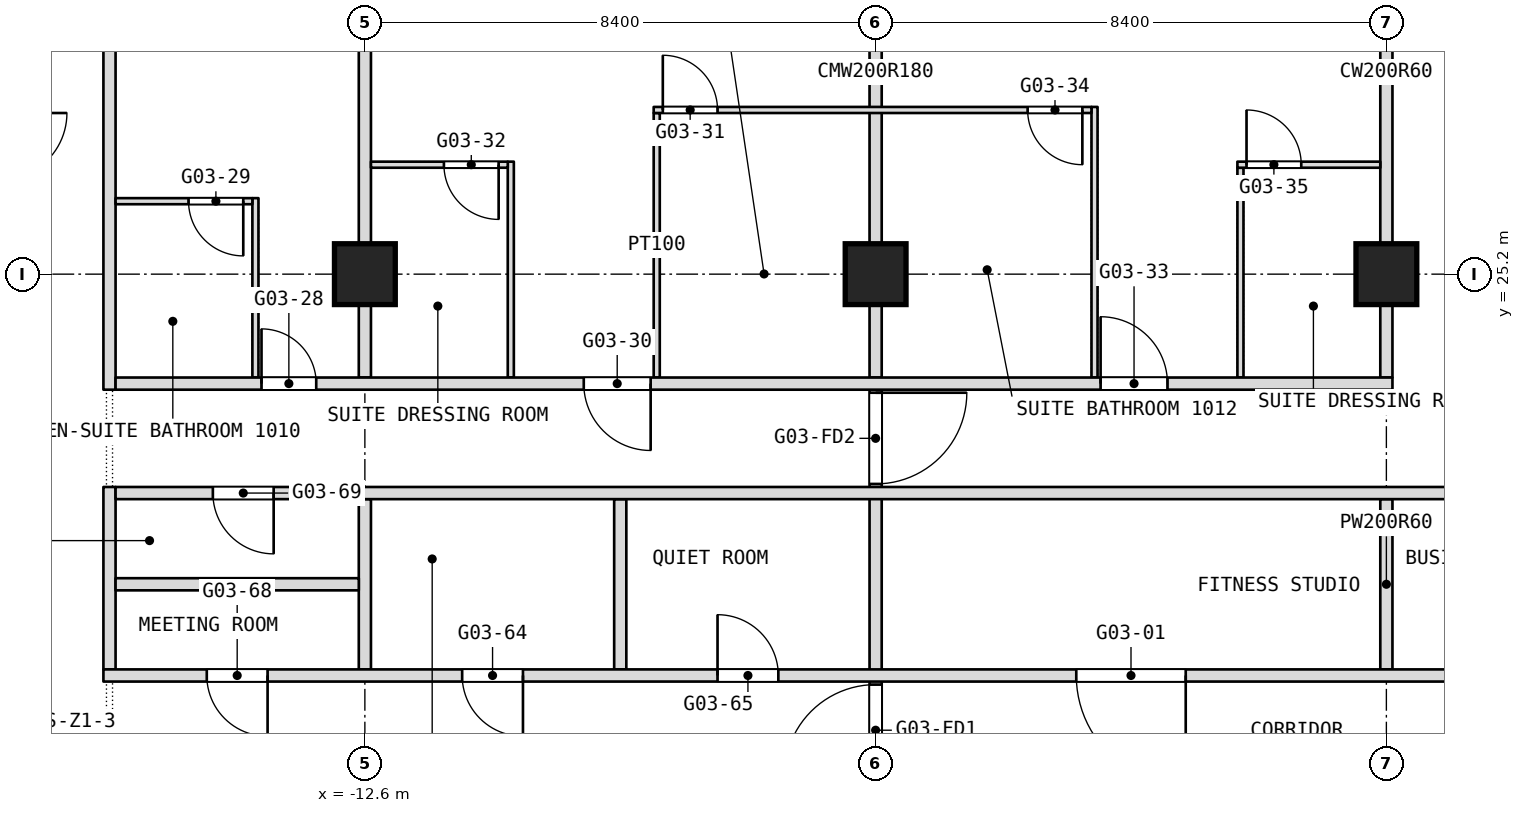
"""IFC4 building model, lengths in metres.
Left out: names, types, materials, properties, quantities, classifications, styles, units other than length and angle.
Written with IfcOpenShell. Run it as: python <this file> out.ifc"""

import sys

from ifc_helpers import new_model, si_unit, direction, frame, frame_2d, origin, origin_2d, place, context, subcontext, project, spatial, rectangle, extrude, element, fill, save


model = new_model("IFC4")
c1 = context("Model", 3, precision=1e-05, world=origin(), true_north=direction((0.0, 1.0)))
c2 = subcontext(c1, "Body", "Model", "MODEL_VIEW")
j1 = project(units=[si_unit("LENGTHUNIT", "METRE"), si_unit("PLANEANGLEUNIT", "RADIAN")], contexts=[c1])
p1 = place(None, origin())
s1 = spatial("IfcSite", under=j1, at=p1, CompositionType="ELEMENT")
p2 = place(p1, origin())
s2 = spatial("IfcBuilding", under=s1, at=p2, CompositionType="ELEMENT")
p3 = place(p2, frame((0.0, 0.0, 50.9)))
s3 = spatial("IfcBuildingStorey", under=s2, at=p3, CompositionType="ELEMENT", Elevation=50.9)
for number, where, z_axis, x_axis in (
    (1, (-12.6, 25.2, 0.0), (0.0, 0.0, 1.0), (1.0, 0.0, 0.0)),
    (2, (-4.2, 25.2, 0.0), (0.0, 0.0, 1.0), (1.0, 0.0, 0.0)),
    (3, (4.2, 25.2, 0.0), (0.0, 0.0, 1.0), (1.0, 0.0, 0.0)),
):
    element("IfcColumn", number, at=place(p3, frame(where, z_axis=z_axis, x_axis=x_axis)), inside=s3, PredefinedType="COLUMN", context=c2, shape_type="SweptSolid", body=[
        extrude(rectangle(XDim=1.0, YDim=1.0, at=origin_2d()), origin(), (0.0, 0.0, 1.0), 3.6),
    ])
p4 = place(p3, frame((4.2, 18.7, 0.0), z_axis=(0.0, 0.0, 1.0), x_axis=(0.0, 1.0, 0.0)))
e4 = element("IfcWall", 4, at=p4, inside=s3, PredefinedType="PARTITIONING", context=c2, shape_type="SweptSolid", body=[
    extrude(rectangle(XDim=2.8, YDim=0.2, at=frame_2d((1.4, 0.0))), origin(), (0.0, 0.0, 1.0), 3.34),
])
p5 = place(p3, frame((4.2, 23.5, 0.0), z_axis=(0.0, 0.0, 1.0), x_axis=(0.0, 1.0, 0.0)))
e5 = element("IfcWall", 5, at=p5, inside=s3, PredefinedType="PARTITIONING", context=c2, shape_type="SweptSolid", body=[
    extrude(rectangle(XDim=10.04, YDim=0.2, at=frame_2d((5.02, 0.0))), origin(), (0.0, 0.0, 1.0), 3.34),
])
p6 = place(p3, frame((1.8, 23.5, 0.0), z_axis=(0.0, 0.0, 1.0), x_axis=(0.0, 1.0, 0.0)))
e6 = element("IfcWall", 6, at=p6, inside=s3, PredefinedType="PARTITIONING", context=c2, shape_type="SweptSolid", body=[
    extrude(rectangle(XDim=3.45, YDim=0.1, at=frame_2d((1.725, 0.0))), origin(), (0.0, 0.0, 1.0), 3.34),
])
p7 = place(p3, frame((-0.6, 23.5, 0.0), z_axis=(0.0, 0.0, 1.0), x_axis=(0.0, 1.0, 0.0)))
e7 = element("IfcWall", 7, at=p7, inside=s3, PredefinedType="PARTITIONING", context=c2, shape_type="SweptSolid", body=[
    extrude(rectangle(XDim=4.45, YDim=0.1, at=frame_2d((2.225, 0.0))), origin(), (0.0, 0.0, 1.0), 3.34),
])
p8 = place(p3, frame((-4.2, 16.8, 0.0), z_axis=(0.0, 0.0, 1.0), x_axis=(0.0, 1.0, 0.0)))
e8 = element("IfcWall", 8, at=p8, inside=s3, PredefinedType="PARTITIONING", context=c2, shape_type="SweptSolid", body=[
    extrude(rectangle(XDim=6.7, YDim=0.2, at=frame_2d((3.35, 0.0))), origin(), (0.0, 0.0, 1.0), 3.34),
])
p9 = place(p8, frame((0.15, 0.0, 0.0)))
e9 = element("IfcOpeningElement", 9, at=p9, cuts=e8, PredefinedType="OPENING", context=c2, shape_type="SweptSolid", body=[
    extrude(rectangle(XDim=1.5, YDim=2.1, at=frame_2d((0.75, 1.05))), frame((0.0, 0.1, 0.0), z_axis=(0.0, -1.0, 0.0), x_axis=(1.0, 0.0, 0.0)), (0.0, 0.0, 1.0), 0.2),
])
p10 = place(p8, frame((4.95, 0.0, 0.0)))
e10 = element("IfcOpeningElement", 10, at=p10, cuts=e8, PredefinedType="OPENING", context=c2, shape_type="SweptSolid", body=[
    extrude(rectangle(XDim=1.5, YDim=2.1, at=frame_2d((0.75, 1.05))), frame((0.0, 0.1, 0.0), z_axis=(0.0, -1.0, 0.0), x_axis=(1.0, 0.0, 0.0)), (0.0, 0.0, 1.0), 0.2),
])
p11 = place(p3, frame((-4.2, 23.5, 0.0), z_axis=(0.0, 0.0, 1.0), x_axis=(0.0, 1.0, 0.0)))
e11 = element("IfcWall", 11, at=p11, inside=s3, PredefinedType="PARTITIONING", context=c2, shape_type="SweptSolid", body=[
    extrude(rectangle(XDim=10.04, YDim=0.2, at=frame_2d((5.02, 0.0))), origin(), (0.0, 0.0, 1.0), 3.34),
])
p12 = place(p3, frame((-7.8, 23.5, 0.0), z_axis=(0.0, 0.0, 1.0), x_axis=(0.0, 1.0, 0.0)))
e12 = element("IfcWall", 12, at=p12, inside=s3, PredefinedType="PARTITIONING", context=c2, shape_type="SweptSolid", body=[
    extrude(rectangle(XDim=4.35, YDim=0.1, at=frame_2d((2.175, 0.0))), origin(), (0.0, 0.0, 1.0), 3.34),
])
p13 = place(p3, frame((-8.4, 18.7, 0.0), z_axis=(0.0, 0.0, 1.0), x_axis=(0.0, 1.0, 0.0)))
e13 = element("IfcWall", 13, at=p13, inside=s3, PredefinedType="PARTITIONING", context=c2, shape_type="SweptSolid", body=[
    extrude(rectangle(XDim=2.8, YDim=0.2, at=frame_2d((1.4, 0.0))), origin(), (0.0, 0.0, 1.0), 3.34),
])
p14 = place(p3, frame((-10.2, 23.5, 0.0), z_axis=(0.0, 0.0, 1.0), x_axis=(0.0, 1.0, 0.0)))
e14 = element("IfcWall", 14, at=p14, inside=s3, PredefinedType="PARTITIONING", context=c2, shape_type="SweptSolid", body=[
    extrude(rectangle(XDim=3.55, YDim=0.1, at=frame_2d((1.775, 0.0))), origin(), (0.0, 0.0, 1.0), 3.34),
])
p15 = place(p3, frame((-12.6, 18.7, 0.0), z_axis=(0.0, 0.0, 1.0), x_axis=(0.0, 1.0, 0.0)))
e15 = element("IfcWall", 15, at=p15, inside=s3, PredefinedType="PARTITIONING", context=c2, shape_type="SweptSolid", body=[
    extrude(rectangle(XDim=2.8, YDim=0.2, at=frame_2d((1.4, 0.0))), origin(), (0.0, 0.0, 1.0), 3.34),
])
p16 = place(p3, frame((-12.6, 23.5, 0.0), z_axis=(0.0, 0.0, 1.0), x_axis=(0.0, 1.0, 0.0)))
e16 = element("IfcWall", 16, at=p16, inside=s3, PredefinedType="PARTITIONING", context=c2, shape_type="SweptSolid", body=[
    extrude(rectangle(XDim=10.04, YDim=0.2, at=frame_2d((5.02, 0.0))), origin(), (0.0, 0.0, 1.0), 3.34),
])
p17 = place(p3, frame((-14.4, 23.5, 0.0), z_axis=(0.0, 0.0, 1.0), x_axis=(0.0, 1.0, 0.0)))
e17 = element("IfcWall", 17, at=p17, inside=s3, PredefinedType="PARTITIONING", context=c2, shape_type="SweptSolid", body=[
    extrude(rectangle(XDim=2.95, YDim=0.1, at=frame_2d((1.475, 0.0))), origin(), (0.0, 0.0, 1.0), 3.34),
])
p18 = place(p3, frame((-16.8, 18.7, 0.0), z_axis=(0.0, 0.0, 1.0), x_axis=(0.0, 1.0, 0.0)))
e18 = element("IfcWall", 18, at=p18, inside=s3, PredefinedType="PARTITIONING", context=c2, shape_type="SweptSolid", body=[
    extrude(rectangle(XDim=3.0, YDim=0.2, at=frame_2d((1.5, 0.0))), origin(), (0.0, 0.0, 1.0), 3.34),
])
p19 = place(p3, frame((-16.8, 23.3, 0.0), z_axis=(0.0, 0.0, 1.0), x_axis=(0.0, 1.0, 0.0)))
e19 = element("IfcWall", 19, at=p19, inside=s3, PredefinedType="PARTITIONING", context=c2, shape_type="SweptSolid", body=[
    extrude(rectangle(XDim=10.24, YDim=0.2, at=frame_2d((5.12, 0.0))), origin(), (0.0, 0.0, 1.0), 3.34),
])
p20 = place(p3, frame((-16.9, 18.6, 0.0), z_axis=(0.0, 0.0, 1.0), x_axis=(1.0, 0.0, 0.0)))
e20 = element("IfcWall", 20, at=p20, inside=s3, PredefinedType="PARTITIONING", context=c2, shape_type="SweptSolid", body=[
    extrude(rectangle(XDim=25.1, YDim=0.2, at=frame_2d((12.55, 0.0))), origin(), (0.0, 0.0, 1.0), 3.34),
])
p21 = place(p20, frame((16.0, 0.0, 0.0)))
e21 = element("IfcOpeningElement", 21, at=p21, cuts=e20, PredefinedType="OPENING", context=c2, shape_type="SweptSolid", body=[
    extrude(rectangle(XDim=1.8, YDim=2.1, at=frame_2d((0.9, 1.05))), frame((0.0, 0.1, 0.0), z_axis=(0.0, -1.0, 0.0), x_axis=(1.0, 0.0, 0.0)), (0.0, 0.0, 1.0), 0.2),
])
p22 = place(p20, frame((22.55, 0.0, 0.0)))
e22 = element("IfcOpeningElement", 22, at=p22, cuts=e20, PredefinedType="OPENING", context=c2, shape_type="SweptSolid", body=[
    extrude(rectangle(XDim=1.0, YDim=2.1, at=frame_2d((0.5, 1.05))), frame((0.0, 0.1, 0.0), z_axis=(0.0, -1.0, 0.0), x_axis=(1.0, 0.0, 0.0)), (0.0, 0.0, 1.0), 0.2),
])
p23 = place(p20, frame((5.9, 0.0, 0.0)))
e23 = element("IfcOpeningElement", 23, at=p23, cuts=e20, PredefinedType="OPENING", context=c2, shape_type="SweptSolid", body=[
    extrude(rectangle(XDim=1.0, YDim=2.1, at=frame_2d((0.5, 1.05))), frame((0.0, 0.1, 0.0), z_axis=(0.0, -1.0, 0.0), x_axis=(1.0, 0.0, 0.0)), (0.0, 0.0, 1.0), 0.2),
])
p24 = place(p20, frame((10.1, 0.0, 0.0)))
e24 = element("IfcOpeningElement", 24, at=p24, cuts=e20, PredefinedType="OPENING", context=c2, shape_type="SweptSolid", body=[
    extrude(rectangle(XDim=1.0, YDim=2.1, at=frame_2d((0.5, 1.05))), frame((0.0, 0.1, 0.0), z_axis=(0.0, -1.0, 0.0), x_axis=(1.0, 0.0, 0.0)), (0.0, 0.0, 1.0), 0.2),
])
p25 = place(p20, frame((1.7, 0.0, 0.0)))
e25 = element("IfcOpeningElement", 25, at=p25, cuts=e20, PredefinedType="OPENING", context=c2, shape_type="SweptSolid", body=[
    extrude(rectangle(XDim=1.0, YDim=2.1, at=frame_2d((0.5, 1.05))), frame((0.0, 0.1, 0.0), z_axis=(0.0, -1.0, 0.0), x_axis=(1.0, 0.0, 0.0)), (0.0, 0.0, 1.0), 0.2),
])
p26 = place(p3, frame((-16.7, 20.1, 0.0), z_axis=(0.0, 0.0, 1.0), x_axis=(1.0, 0.0, 0.0)))
e26 = element("IfcWall", 26, at=p26, inside=s3, PredefinedType="PARTITIONING", context=c2, shape_type="SweptSolid", body=[
    extrude(rectangle(XDim=4.0, YDim=0.2, at=frame_2d((2.0, 0.0))), origin(), (0.0, 0.0, 1.0), 3.34),
])
p27 = place(p3, frame((-16.7, 21.6, 0.0), z_axis=(0.0, 0.0, 1.0), x_axis=(1.0, 0.0, 0.0)))
e27 = element("IfcWall", 27, at=p27, inside=s3, PredefinedType="PARTITIONING", context=c2, shape_type="SweptSolid", body=[
    extrude(rectangle(XDim=24.9, YDim=0.2, at=frame_2d((12.45, 0.0))), origin(), (0.0, 0.0, 1.0), 3.34),
])
p28 = place(p27, frame((1.6, 0.0, 0.0)))
e28 = element("IfcOpeningElement", 28, at=p28, cuts=e27, PredefinedType="OPENING", context=c2, shape_type="SweptSolid", body=[
    extrude(rectangle(XDim=1.0, YDim=2.1, at=frame_2d((0.5, 1.05))), frame((0.0, 0.1, 0.0), z_axis=(0.0, -1.0, 0.0), x_axis=(1.0, 0.0, 0.0)), (0.0, 0.0, 1.0), 0.2),
])
p29 = place(p3, frame((-16.7, 23.4, 0.0), z_axis=(0.0, 0.0, 1.0), x_axis=(1.0, 0.0, 0.0)))
e29 = element("IfcWall", 29, at=p29, inside=s3, PredefinedType="PARTITIONING", context=c2, shape_type="SweptSolid", body=[
    extrude(rectangle(XDim=21.0, YDim=0.2, at=frame_2d((10.5, 0.0))), origin(), (0.0, 0.0, 1.0), 3.34),
])
p30 = place(p29, frame((2.4, 0.0, 0.0)))
e30 = element("IfcOpeningElement", 30, at=p30, cuts=e29, PredefinedType="OPENING", context=c2, shape_type="SweptSolid", body=[
    extrude(rectangle(XDim=0.9, YDim=2.1, at=frame_2d((0.45, 1.05))), frame((0.0, 0.1, 0.0), z_axis=(0.0, -1.0, 0.0), x_axis=(1.0, 0.0, 0.0)), (0.0, 0.0, 1.0), 0.2),
])
p31 = place(p29, frame((7.7, 0.0, 0.0)))
e31 = element("IfcOpeningElement", 31, at=p31, cuts=e29, PredefinedType="OPENING", context=c2, shape_type="SweptSolid", body=[
    extrude(rectangle(XDim=1.1, YDim=2.1, at=frame_2d((0.55, 1.05))), frame((0.0, 0.1, 0.0), z_axis=(0.0, -1.0, 0.0), x_axis=(1.0, 0.0, 0.0)), (0.0, 0.0, 1.0), 0.2),
])
p32 = place(p29, frame((16.2, 0.0, 0.0)))
e32 = element("IfcOpeningElement", 32, at=p32, cuts=e29, PredefinedType="OPENING", context=c2, shape_type="SweptSolid", body=[
    extrude(rectangle(XDim=1.1, YDim=2.1, at=frame_2d((0.55, 1.05))), frame((0.0, 0.1, 0.0), z_axis=(0.0, -1.0, 0.0), x_axis=(1.0, 0.0, 0.0)), (0.0, 0.0, 1.0), 0.2),
])
p33 = place(p3, frame((-16.7, 26.4, 0.0), z_axis=(0.0, 0.0, 1.0), x_axis=(1.0, 0.0, 0.0)))
e33 = element("IfcWall", 33, at=p33, inside=s3, PredefinedType="PARTITIONING", context=c2, shape_type="SweptSolid", body=[
    extrude(rectangle(XDim=2.25, YDim=0.1, at=frame_2d((1.125, 0.0))), origin(), (0.0, 0.0, 1.0), 3.34),
])
p34 = place(p33, frame((1.2, 0.0, 0.0)))
e34 = element("IfcOpeningElement", 34, at=p34, cuts=e33, PredefinedType="OPENING", context=c2, shape_type="SweptSolid", body=[
    extrude(rectangle(XDim=0.9, YDim=2.1, at=frame_2d((0.45, 1.05))), frame((0.0, 0.05, 0.0), z_axis=(0.0, -1.0, 0.0), x_axis=(1.0, 0.0, 0.0)), (0.0, 0.0, 1.0), 0.1),
])
p35 = place(p3, frame((-12.5, 27.0, 0.0), z_axis=(0.0, 0.0, 1.0), x_axis=(1.0, 0.0, 0.0)))
e35 = element("IfcWall", 35, at=p35, inside=s3, PredefinedType="PARTITIONING", context=c2, shape_type="SweptSolid", body=[
    extrude(rectangle(XDim=2.25, YDim=0.1, at=frame_2d((1.125, 0.0))), origin(), (0.0, 0.0, 1.0), 3.34),
])
p36 = place(p35, frame((1.2, 0.0, 0.0)))
e36 = element("IfcOpeningElement", 36, at=p36, cuts=e35, PredefinedType="OPENING", context=c2, shape_type="SweptSolid", body=[
    extrude(rectangle(XDim=0.9, YDim=2.1, at=frame_2d((0.45, 1.05))), frame((0.0, 0.05, 0.0), z_axis=(0.0, -1.0, 0.0), x_axis=(1.0, 0.0, 0.0)), (0.0, 0.0, 1.0), 0.1),
])
p37 = place(p3, frame((1.75, 27.0, 0.0), z_axis=(0.0, 0.0, 1.0), x_axis=(1.0, 0.0, 0.0)))
e37 = element("IfcWall", 37, at=p37, inside=s3, PredefinedType="PARTITIONING", context=c2, shape_type="SweptSolid", body=[
    extrude(rectangle(XDim=2.35, YDim=0.1, at=frame_2d((1.175, 0.0))), origin(), (0.0, 0.0, 1.0), 3.34),
])
p38 = place(p37, frame((0.15, 0.0, 0.0)))
e38 = element("IfcOpeningElement", 38, at=p38, cuts=e37, PredefinedType="OPENING", context=c2, shape_type="SweptSolid", body=[
    extrude(rectangle(XDim=0.9, YDim=2.1, at=frame_2d((0.45, 1.05))), frame((0.0, 0.05, 0.0), z_axis=(0.0, -1.0, 0.0), x_axis=(1.0, 0.0, 0.0)), (0.0, 0.0, 1.0), 0.1),
])
p39 = place(p3, frame((-7.85, 27.9, 0.0), z_axis=(0.0, 0.0, 1.0), x_axis=(1.0, 0.0, 0.0)))
e39 = element("IfcWall", 39, at=p39, inside=s3, PredefinedType="PARTITIONING", context=c2, shape_type="SweptSolid", body=[
    extrude(rectangle(XDim=7.2, YDim=0.1, at=frame_2d((3.6, 0.0))), origin(), (0.0, 0.0, 1.0), 3.34),
])
p40 = place(p39, frame((0.15, 0.0, 0.0)))
e40 = element("IfcOpeningElement", 40, at=p40, cuts=e39, PredefinedType="OPENING", context=c2, shape_type="SweptSolid", body=[
    extrude(rectangle(XDim=0.9, YDim=2.1, at=frame_2d((0.45, 1.05))), frame((0.0, 0.05, 0.0), z_axis=(0.0, -1.0, 0.0), x_axis=(1.0, 0.0, 0.0)), (0.0, 0.0, 1.0), 0.1),
])
p41 = place(p39, frame((6.15, 0.0, 0.0)))
e41 = element("IfcOpeningElement", 41, at=p41, cuts=e39, PredefinedType="OPENING", context=c2, shape_type="SweptSolid", body=[
    extrude(rectangle(XDim=0.9, YDim=2.1, at=frame_2d((0.45, 1.05))), frame((0.0, 0.05, 0.0), z_axis=(0.0, -1.0, 0.0), x_axis=(1.0, 0.0, 0.0)), (0.0, 0.0, 1.0), 0.1),
])
p42 = place(p21, origin())
e42 = element("IfcDoor", 42, at=p42, inside=s3, OperationType="DOUBLE_DOOR_SINGLE_SWING", PredefinedType="DOOR", context=c2, shape_type="SweptSolid", body=[
    extrude(rectangle(XDim=1.8, YDim=2.1, at=frame_2d((0.9, 1.05))), frame((0.0, 0.025, 0.0), z_axis=(0.0, -1.0, 0.0), x_axis=(1.0, 0.0, 0.0)), (0.0, 0.0, 1.0), 0.05),
])
fill(e21, e42)
p43 = place(p23, origin())
e43 = element("IfcDoor", 43, at=p43, inside=s3, OperationType="SINGLE_SWING_RIGHT", PredefinedType="DOOR", context=c2, shape_type="SweptSolid", body=[
    extrude(rectangle(XDim=1.0, YDim=2.1, at=frame_2d((0.5, 1.05))), frame((0.0, 0.025, 0.0), z_axis=(0.0, -1.0, 0.0), x_axis=(1.0, 0.0, 0.0)), (0.0, 0.0, 1.0), 0.05),
])
fill(e23, e43)
p44 = place(p24, origin())
e44 = element("IfcDoor", 44, at=p44, inside=s3, OperationType="SINGLE_SWING_LEFT", PredefinedType="DOOR", context=c2, shape_type="SweptSolid", body=[
    extrude(rectangle(XDim=1.0, YDim=2.1, at=frame_2d((0.5, 1.05))), frame((0.0, 0.025, 0.0), z_axis=(0.0, -1.0, 0.0), x_axis=(1.0, 0.0, 0.0)), (0.0, 0.0, 1.0), 0.05),
])
fill(e24, e44)
p45 = place(p25, origin())
e45 = element("IfcDoor", 45, at=p45, inside=s3, OperationType="SINGLE_SWING_RIGHT", PredefinedType="DOOR", context=c2, shape_type="SweptSolid", body=[
    extrude(rectangle(XDim=1.0, YDim=2.1, at=frame_2d((0.5, 1.05))), frame((0.0, 0.025, 0.0), z_axis=(0.0, -1.0, 0.0), x_axis=(1.0, 0.0, 0.0)), (0.0, 0.0, 1.0), 0.05),
])
fill(e25, e45)
p46 = place(p28, origin())
e46 = element("IfcDoor", 46, at=p46, inside=s3, OperationType="SINGLE_SWING_RIGHT", PredefinedType="DOOR", context=c2, shape_type="SweptSolid", body=[
    extrude(rectangle(XDim=1.0, YDim=2.1, at=frame_2d((0.5, 1.05))), frame((0.0, 0.025, 0.0), z_axis=(0.0, -1.0, 0.0), x_axis=(1.0, 0.0, 0.0)), (0.0, 0.0, 1.0), 0.05),
])
fill(e28, e46)
p47 = place(p30, origin())
e47 = element("IfcDoor", 47, at=p47, inside=s3, OperationType="SINGLE_SWING_LEFT", PredefinedType="DOOR", context=c2, shape_type="SweptSolid", body=[
    extrude(rectangle(XDim=0.9, YDim=2.1, at=frame_2d((0.45, 1.05))), frame((0.0, 0.025, 0.0), z_axis=(0.0, -1.0, 0.0), x_axis=(1.0, 0.0, 0.0)), (0.0, 0.0, 1.0), 0.05),
])
fill(e30, e47)
p48 = place(p31, origin())
e48 = element("IfcDoor", 48, at=p48, inside=s3, OperationType="SINGLE_SWING_RIGHT", PredefinedType="DOOR", context=c2, shape_type="SweptSolid", body=[
    extrude(rectangle(XDim=1.1, YDim=2.1, at=frame_2d((0.55, 1.05))), frame((0.0, 0.025, 0.0), z_axis=(0.0, -1.0, 0.0), x_axis=(1.0, 0.0, 0.0)), (0.0, 0.0, 1.0), 0.05),
])
fill(e31, e48)
p49 = place(p32, origin())
e49 = element("IfcDoor", 49, at=p49, inside=s3, OperationType="SINGLE_SWING_LEFT", PredefinedType="DOOR", context=c2, shape_type="SweptSolid", body=[
    extrude(rectangle(XDim=1.1, YDim=2.1, at=frame_2d((0.55, 1.05))), frame((0.0, 0.025, 0.0), z_axis=(0.0, -1.0, 0.0), x_axis=(1.0, 0.0, 0.0)), (0.0, 0.0, 1.0), 0.05),
])
fill(e32, e49)
p50 = place(p34, origin())
e50 = element("IfcDoor", 50, at=p50, inside=s3, OperationType="SINGLE_SWING_LEFT", PredefinedType="DOOR", context=c2, shape_type="SweptSolid", body=[
    extrude(rectangle(XDim=0.9, YDim=2.1, at=frame_2d((0.45, 1.05))), frame((0.0, 0.025, 0.0), z_axis=(0.0, -1.0, 0.0), x_axis=(1.0, 0.0, 0.0)), (0.0, 0.0, 1.0), 0.05),
])
fill(e34, e50)
p51 = place(p36, origin())
e51 = element("IfcDoor", 51, at=p51, inside=s3, OperationType="SINGLE_SWING_LEFT", PredefinedType="DOOR", context=c2, shape_type="SweptSolid", body=[
    extrude(rectangle(XDim=0.9, YDim=2.1, at=frame_2d((0.45, 1.05))), frame((0.0, 0.025, 0.0), z_axis=(0.0, -1.0, 0.0), x_axis=(1.0, 0.0, 0.0)), (0.0, 0.0, 1.0), 0.05),
])
fill(e36, e51)
p52 = place(p38, origin())
e52 = element("IfcDoor", 52, at=p52, inside=s3, OperationType="SINGLE_SWING_RIGHT", PredefinedType="DOOR", context=c2, shape_type="SweptSolid", body=[
    extrude(rectangle(XDim=0.9, YDim=2.1, at=frame_2d((0.45, 1.05))), frame((0.0, 0.025, 0.0), z_axis=(0.0, -1.0, 0.0), x_axis=(1.0, 0.0, 0.0)), (0.0, 0.0, 1.0), 0.05),
])
fill(e38, e52)
p53 = place(p40, origin())
e53 = element("IfcDoor", 53, at=p53, inside=s3, OperationType="SINGLE_SWING_RIGHT", PredefinedType="DOOR", context=c2, shape_type="SweptSolid", body=[
    extrude(rectangle(XDim=0.9, YDim=2.1, at=frame_2d((0.45, 1.05))), frame((0.0, 0.025, 0.0), z_axis=(0.0, -1.0, 0.0), x_axis=(1.0, 0.0, 0.0)), (0.0, 0.0, 1.0), 0.05),
])
fill(e40, e53)
p54 = place(p41, origin())
e54 = element("IfcDoor", 54, at=p54, inside=s3, OperationType="SINGLE_SWING_LEFT", PredefinedType="DOOR", context=c2, shape_type="SweptSolid", body=[
    extrude(rectangle(XDim=0.9, YDim=2.1, at=frame_2d((0.45, 1.05))), frame((0.0, 0.025, 0.0), z_axis=(0.0, -1.0, 0.0), x_axis=(1.0, 0.0, 0.0)), (0.0, 0.0, 1.0), 0.05),
])
fill(e41, e54)
p55 = place(p9, origin())
e55 = element("IfcDoor", 55, at=p55, inside=s3, OperationType="DOUBLE_DOOR_DOUBLE_SWING", PredefinedType="DOOR", context=c2, shape_type="SweptSolid", body=[
    extrude(rectangle(XDim=1.5, YDim=2.1, at=frame_2d((0.75, 1.05))), frame((0.0, 0.025, 0.0), z_axis=(0.0, -1.0, 0.0), x_axis=(1.0, 0.0, 0.0)), (0.0, 0.0, 1.0), 0.05),
])
fill(e9, e55)
p56 = place(p10, origin())
e56 = element("IfcDoor", 56, at=p56, inside=s3, OperationType="DOUBLE_DOOR_DOUBLE_SWING", PredefinedType="DOOR", context=c2, shape_type="SweptSolid", body=[
    extrude(rectangle(XDim=1.5, YDim=2.1, at=frame_2d((0.75, 1.05))), frame((0.0, 0.025, 0.0), z_axis=(0.0, -1.0, 0.0), x_axis=(1.0, 0.0, 0.0)), (0.0, 0.0, 1.0), 0.05),
])
fill(e10, e56)
save(model, sys.argv[1])
